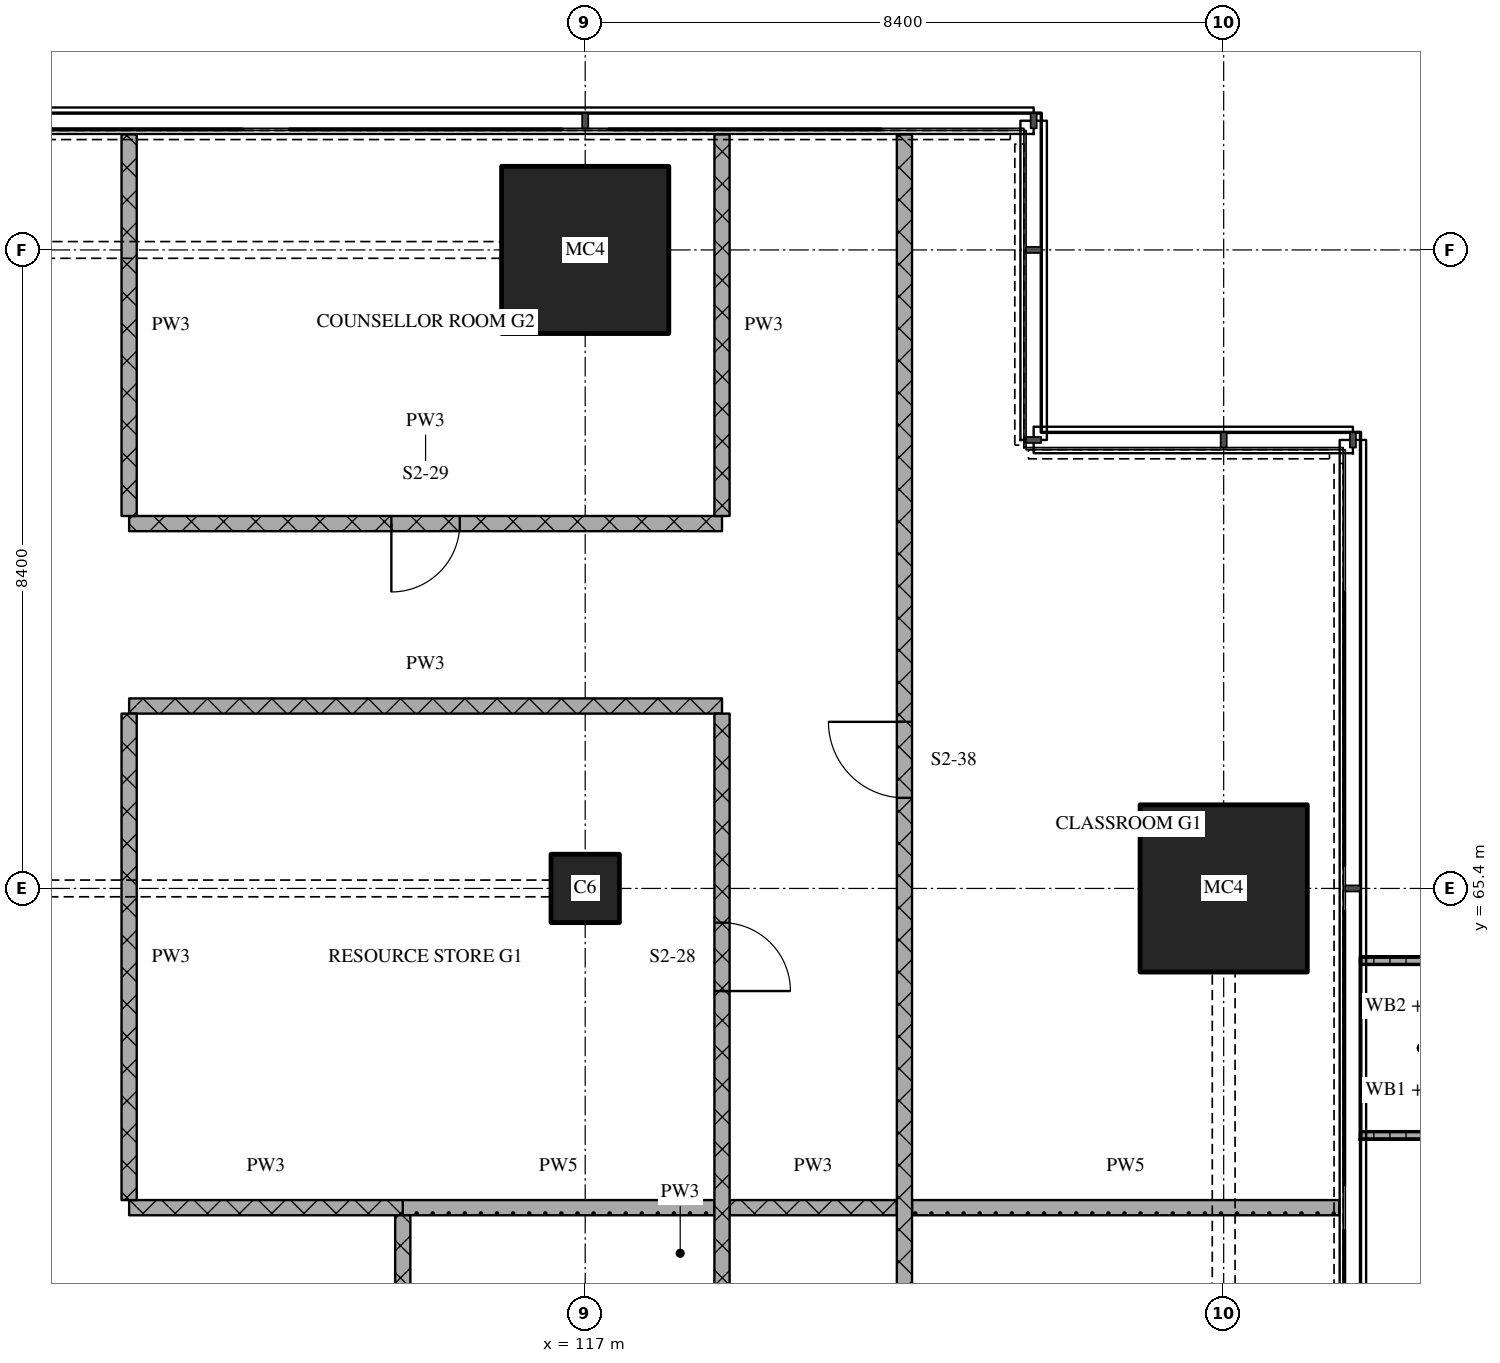
"""IFC4 building model, lengths in metres.
Left out: names, types, materials, properties, quantities, classifications, styles, units other than length and angle.
Written with IfcOpenShell. Run it as: python <this file> out.ifc"""

import sys

from ifc_helpers import new_model, si_unit, direction, frame, frame_2d, origin, origin_2d, place, context, subcontext, project, spatial, polyline, rectangle, outline, extrude, element, fill, save


model = new_model("IFC4")
c1 = context("Model", 3, precision=1e-05, world=origin(), true_north=direction((0.0, 1.0)))
c2 = subcontext(c1, "Body", "Model", "MODEL_VIEW")
j1 = project(units=[si_unit("LENGTHUNIT", "METRE"), si_unit("PLANEANGLEUNIT", "RADIAN")], contexts=[c1])
p1 = place(None, origin())
s1 = spatial("IfcSite", under=j1, at=p1, CompositionType="ELEMENT")
p2 = place(p1, origin())
s2 = spatial("IfcBuilding", under=s1, at=p2, CompositionType="ELEMENT")
p3 = place(p2, frame((0.0, 0.0, 28.2)))
s3 = spatial("IfcBuildingStorey", under=s2, at=p3, CompositionType="ELEMENT", Elevation=28.2)
p4 = place(p3, frame((117.0, 65.4, 0.0), z_axis=(0.0, 0.0, 1.0), x_axis=(1.0, 0.0, 0.0)))
e1 = element("IfcColumn", 1, at=p4, inside=s3, PredefinedType="COLUMN", context=c2, shape_type="SweptSolid", body=[
    extrude(rectangle(XDim=0.9, YDim=0.9, at=origin_2d()), origin(), (0.0, 0.0, 1.0), 4.5),
])
for number, where, z_axis, x_axis in (
    (2, (117.0, 73.8, 0.0), (0.0, 0.0, 1.0), (1.0, 0.0, 0.0)),
    (3, (125.4, 65.4, 0.0), (0.0, 0.0, 1.0), (1.0, 0.0, 0.0)),
):
    element("IfcColumn", number, at=place(p3, frame(where, z_axis=z_axis, x_axis=x_axis)), inside=s3, PredefinedType="COLUMN", context=c2, shape_type="SweptSolid", body=[
        extrude(rectangle(XDim=2.2, YDim=2.2, at=origin_2d()), origin(), (0.0, 0.0, 1.0), 4.5),
    ])
p5 = place(p3, origin())
e4 = element("IfcWall", 4, at=p5, inside=s3, PredefinedType="SOLIDWALL", context=c2, shape_type="SweptSolid", body=[
    extrude(outline(polyline([(127.2, 62.1), (127.2, 62.2), (128.7, 62.2), (128.7, 64.4), (127.2, 64.4), (127.2, 64.5), (128.8, 64.5), (128.8, 62.1), (127.2, 62.1)])), origin(), (0.0, 0.0, 1.0), 1.0),
])
p6 = place(p3, frame((111.0, 61.2, 0.0), z_axis=(0.0, 0.0, 1.0), x_axis=(1.0, 0.0, 0.0)))
e5 = element("IfcWall", 5, at=p6, inside=s3, PredefinedType="PARTITIONING", context=c2, shape_type="SweptSolid", body=[
    extrude(rectangle(XDim=3.6, YDim=0.2, at=frame_2d((1.8, 0.0))), origin(), (0.0, 0.0, 1.0), 4.2),
])
p7 = place(p3, frame((118.9, 61.2, 0.0), z_axis=(0.0, 0.0, 1.0), x_axis=(1.0, 0.0, 0.0)))
e6 = element("IfcWall", 6, at=p7, inside=s3, PredefinedType="PARTITIONING", context=c2, shape_type="SweptSolid", body=[
    extrude(rectangle(XDim=2.2, YDim=0.2, at=frame_2d((1.1, 0.0))), origin(), (0.0, 0.0, 1.0), 4.2),
])
p8 = place(p3, frame((114.6, 61.2, 0.0), z_axis=(0.0, 0.0, 1.0), x_axis=(1.0, 0.0, 0.0)))
e7 = element("IfcWall", 7, at=p8, inside=s3, PredefinedType="PARTITIONING", context=c2, shape_type="SweptSolid", body=[
    extrude(rectangle(XDim=4.1, YDim=0.2, at=frame_2d((2.05, 0.0))), origin(), (0.0, 0.0, 1.0), 4.2),
])
p9 = place(p3, frame((121.3, 61.2, 0.0), z_axis=(0.0, 0.0, 1.0), x_axis=(1.0, 0.0, 0.0)))
e8 = element("IfcWall", 8, at=p9, inside=s3, PredefinedType="PARTITIONING", context=c2, shape_type="SweptSolid", body=[
    extrude(rectangle(XDim=5.62, YDim=0.2, at=frame_2d((2.81, 0.0))), origin(), (0.0, 0.0, 1.0), 4.2),
])
p10 = place(p3, frame((111.0, 67.8, 0.0), z_axis=(0.0, 0.0, 1.0), x_axis=(1.0, 0.0, 0.0)))
e9 = element("IfcWall", 9, at=p10, inside=s3, PredefinedType="PARTITIONING", context=c2, shape_type="SweptSolid", body=[
    extrude(rectangle(XDim=7.8, YDim=0.2, at=frame_2d((3.9, 0.0))), origin(), (0.0, 0.0, 1.0), 4.2),
])
p11 = place(p3, frame((111.0, 70.2, 0.0), z_axis=(0.0, 0.0, 1.0), x_axis=(1.0, 0.0, 0.0)))
e10 = element("IfcWall", 10, at=p11, inside=s3, PredefinedType="PARTITIONING", context=c2, shape_type="SweptSolid", body=[
    extrude(rectangle(XDim=7.8, YDim=0.2, at=frame_2d((3.9, 0.0))), origin(), (0.0, 0.0, 1.0), 4.2),
])
p12 = place(p11, frame((3.45, 0.0, 0.0)))
e11 = element("IfcOpeningElement", 11, at=p12, cuts=e10, PredefinedType="OPENING", context=c2, shape_type="SweptSolid", body=[
    extrude(rectangle(XDim=0.9, YDim=2.1, at=frame_2d((0.45, 1.05))), frame((0.0, 0.11, 0.0), z_axis=(0.0, -1.0, 0.0), x_axis=(1.0, 0.0, 0.0)), (0.0, 0.0, 1.0), 0.22),
])
p13 = place(p3, frame((111.0, 67.7, 0.0), z_axis=(0.0, 0.0, 1.0), x_axis=(0.0, -1.0, 0.0)))
e12 = element("IfcWall", 12, at=p13, inside=s3, PredefinedType="PARTITIONING", context=c2, shape_type="SweptSolid", body=[
    extrude(rectangle(XDim=6.4, YDim=0.2, at=frame_2d((3.2, 0.0))), origin(), (0.0, 0.0, 1.0), 4.2),
])
p14 = place(p3, frame((111.0, 75.32, 0.0), z_axis=(0.0, 0.0, 1.0), x_axis=(0.0, -1.0, 0.0)))
e13 = element("IfcWall", 13, at=p14, inside=s3, PredefinedType="PARTITIONING", context=c2, shape_type="SweptSolid", body=[
    extrude(rectangle(XDim=5.02, YDim=0.2, at=frame_2d((2.51, 0.0))), origin(), (0.0, 0.0, 1.0), 4.2),
])
p15 = place(p3, frame((114.6, 61.1, 0.0), z_axis=(0.0, 0.0, 1.0), x_axis=(0.0, -1.0, 0.0)))
e14 = element("IfcWall", 14, at=p15, inside=s3, PredefinedType="PARTITIONING", context=c2, shape_type="SweptSolid", body=[
    extrude(rectangle(XDim=7.6, YDim=0.2, at=frame_2d((3.8, 0.0))), origin(), (0.0, 0.0, 1.0), 4.2),
])
p16 = place(p3, frame((118.8, 53.5, 0.0), z_axis=(0.0, 0.0, 1.0), x_axis=(0.0, 1.0, 0.0)))
e15 = element("IfcWall", 15, at=p16, inside=s3, PredefinedType="PARTITIONING", context=c2, shape_type="SweptSolid", body=[
    extrude(rectangle(XDim=14.2, YDim=0.2, at=frame_2d((7.1, 0.0))), origin(), (0.0, 0.0, 1.0), 4.2),
])
p17 = place(p16, frame((5.75, 0.0, 0.0)))
e16 = element("IfcOpeningElement", 16, at=p17, cuts=e15, PredefinedType="OPENING", context=c2, shape_type="SweptSolid", body=[
    extrude(rectangle(XDim=0.9, YDim=2.1, at=frame_2d((0.45, 1.05))), frame((0.0, 0.11, 0.0), z_axis=(0.0, -1.0, 0.0), x_axis=(1.0, 0.0, 0.0)), (0.0, 0.0, 1.0), 0.22),
])
p18 = place(p16, frame((10.55, 0.0, 0.0)))
e17 = element("IfcOpeningElement", 17, at=p18, cuts=e15, PredefinedType="OPENING", context=c2, shape_type="SweptSolid", body=[
    extrude(rectangle(XDim=0.9, YDim=2.1, at=frame_2d((0.45, 1.05))), frame((0.0, 0.11, 0.0), z_axis=(0.0, -1.0, 0.0), x_axis=(1.0, 0.0, 0.0)), (0.0, 0.0, 1.0), 0.22),
])
p19 = place(p3, frame((118.8, 75.32, 0.0), z_axis=(0.0, 0.0, 1.0), x_axis=(0.0, -1.0, 0.0)))
e18 = element("IfcWall", 18, at=p19, inside=s3, PredefinedType="PARTITIONING", context=c2, shape_type="SweptSolid", body=[
    extrude(rectangle(XDim=5.02, YDim=0.2, at=frame_2d((2.51, 0.0))), origin(), (0.0, 0.0, 1.0), 4.2),
])
p20 = place(p3, frame((121.2, 75.32, 0.0), z_axis=(0.0, 0.0, 1.0), x_axis=(0.0, -1.0, 0.0)))
e19 = element("IfcWall", 19, at=p20, inside=s3, PredefinedType="PARTITIONING", context=c2, shape_type="SweptSolid", body=[
    extrude(rectangle(XDim=32.02, YDim=0.2, at=frame_2d((16.01, 0.0))), origin(), (0.0, 0.0, 1.0), 4.2),
])
p21 = place(p20, frame((7.729, 0.0, 0.0)))
e20 = element("IfcOpeningElement", 20, at=p21, cuts=e19, PredefinedType="OPENING", context=c2, shape_type="SweptSolid", body=[
    extrude(rectangle(XDim=1.0, YDim=2.1, at=frame_2d((0.5, 1.05))), frame((0.0, 0.11, 0.0), z_axis=(0.0, -1.0, 0.0), x_axis=(1.0, 0.0, 0.0)), (0.0, 0.0, 1.0), 0.22),
])
p22 = place(p20, frame((22.62, 0.0, 0.0)))
e21 = element("IfcOpeningElement", 21, at=p22, cuts=e19, PredefinedType="OPENING", context=c2, shape_type="SweptSolid", body=[
    extrude(rectangle(XDim=1.0, YDim=2.1, at=frame_2d((0.5, 1.05))), frame((0.0, 0.11, 0.0), z_axis=(0.0, -1.0, 0.0), x_axis=(1.0, 0.0, 0.0)), (0.0, 0.0, 1.0), 0.22),
])
p23 = place(p12, origin())
e22 = element("IfcDoor", 22, at=p23, inside=s3, OperationType="SINGLE_SWING_RIGHT", PredefinedType="DOOR", context=c2, shape_type="SweptSolid", body=[
    extrude(rectangle(XDim=0.9, YDim=2.1, at=frame_2d((0.45, 1.05))), frame((0.0, 0.025, 0.0), z_axis=(0.0, -1.0, 0.0), x_axis=(1.0, 0.0, 0.0)), (0.0, 0.0, 1.0), 0.05),
])
fill(e11, e22)
p24 = place(p18, origin())
e23 = element("IfcDoor", 23, at=p24, inside=s3, OperationType="SINGLE_SWING_RIGHT", PredefinedType="DOOR", context=c2, shape_type="SweptSolid", body=[
    extrude(rectangle(XDim=0.9, YDim=2.1, at=frame_2d((0.45, 1.05))), frame((0.0, 0.025, 0.0), z_axis=(0.0, -1.0, 0.0), x_axis=(1.0, 0.0, 0.0)), (0.0, 0.0, 1.0), 0.05),
])
fill(e17, e23)
p25 = place(p21, origin())
e24 = element("IfcDoor", 24, at=p25, inside=s3, OperationType="SINGLE_SWING_RIGHT", PredefinedType="DOOR", context=c2, shape_type="SweptSolid", body=[
    extrude(rectangle(XDim=1.0, YDim=2.1, at=frame_2d((0.5, 1.05))), frame((0.0, 0.025, 0.0), z_axis=(0.0, -1.0, 0.0), x_axis=(1.0, 0.0, 0.0)), (0.0, 0.0, 1.0), 0.05),
])
fill(e20, e24)
save(model, sys.argv[1])
